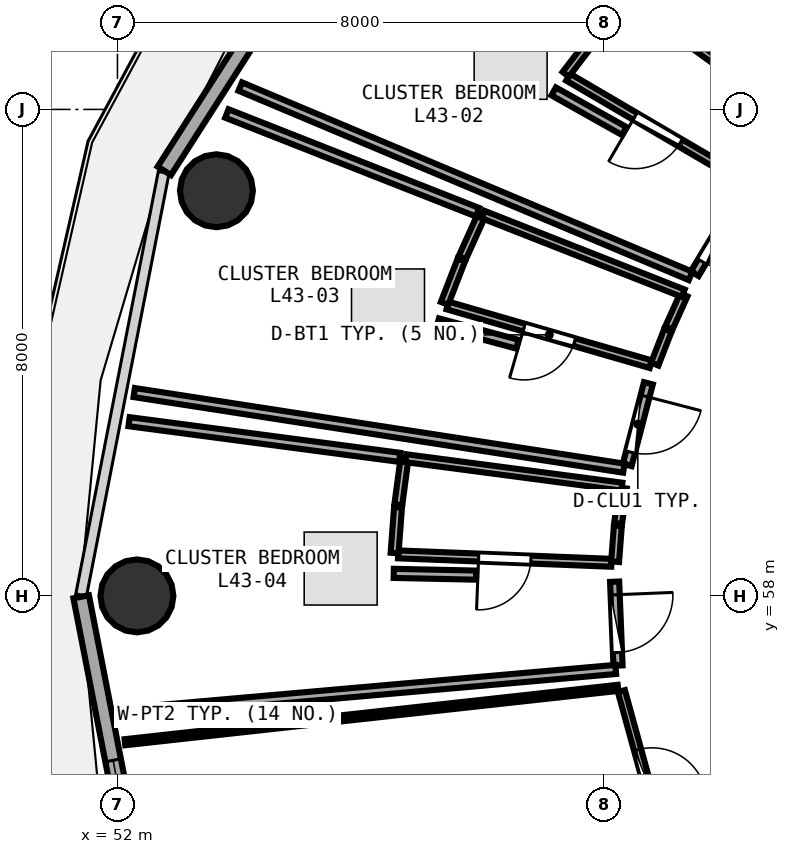
"""IFC4 building model, lengths in metres.
Left out: names, types, materials, properties, quantities, classifications, styles, units other than length and angle.
Written with IfcOpenShell. Run it as: python <this file> out.ifc"""

import sys

from ifc_helpers import new_model, si_unit, direction, frame, frame_2d, origin, origin_2d, place, context, subcontext, project, spatial, rectangle, circle, extrude, element, fill, save


model = new_model("IFC4")
c1 = context("Model", 3, precision=1e-05, world=origin(), true_north=direction((0.0, 1.0)))
c2 = subcontext(c1, "Body", "Model", "MODEL_VIEW")
j1 = project(units=[si_unit("LENGTHUNIT", "METRE"), si_unit("PLANEANGLEUNIT", "RADIAN")], contexts=[c1])
p1 = place(None, origin())
s1 = spatial("IfcSite", under=j1, at=p1, CompositionType="ELEMENT")
p2 = place(p1, origin())
s2 = spatial("IfcBuilding", under=s1, at=p2, CompositionType="ELEMENT")
p3 = place(p2, frame((0.0, 0.0, 169.35)))
s3 = spatial("IfcBuildingStorey", under=s2, at=p3, CompositionType="ELEMENT", Elevation=169.35)
for number, where, z_axis, x_axis in (
    (1, (53.627, 64.663, 0.0), (0.0, 0.0, 1.0), (1.0, 0.0, 0.0)),
    (2, (52.32, 58.0, 0.0), (0.0, 0.0, 1.0), (1.0, 0.0, 0.0)),
):
    element("IfcColumn", number, at=place(p3, frame(where, z_axis=z_axis, x_axis=x_axis)), inside=s3, PredefinedType="COLUMN", context=c2, shape_type="SweptSolid", body=[
        extrude(circle(Radius=0.6, at=origin_2d()), origin(), (0.0, 0.0, 1.0), 3.75),
    ])
p4 = place(p3, frame((56.679, 71.1, 0.0), z_axis=(0.0, 0.0, 1.0), x_axis=(-0.538801521808, -0.842432739213, 0.0)))
e3 = element("IfcWall", 3, at=p4, inside=s3, PredefinedType="SOLIDWALL", context=c2, shape_type="SweptSolid", body=[
    extrude(rectangle(XDim=7.253, YDim=0.26, at=frame_2d((3.627, 0.0))), origin(), (0.0, 0.0, 1.0), 3.475),
])
p5 = place(p4, frame((3.152, 0.0, 0.0)))
e4 = element("IfcOpeningElement", 4, at=p5, cuts=e3, PredefinedType="OPENING", context=c2, shape_type="SweptSolid", body=[
    extrude(rectangle(XDim=0.95, YDim=2.1, at=frame_2d((0.475, 1.05))), frame((0.0, 0.14, 0.0), z_axis=(0.0, -1.0, 0.0), x_axis=(1.0, 0.0, 0.0)), (0.0, 0.0, 1.0), 0.28),
])
p6 = place(p4, frame((1.572, 0.0, 0.85)))
e5 = element("IfcOpeningElement", 5, at=p6, cuts=e3, PredefinedType="OPENING", context=c2, shape_type="SweptSolid", body=[
    extrude(rectangle(XDim=1.2, YDim=1.45, at=frame_2d((0.6, 0.725))), frame((0.0, 0.14, 0.0), z_axis=(0.0, -1.0, 0.0), x_axis=(1.0, 0.0, 0.0)), (0.0, 0.0, 1.0), 0.28),
])
p7 = place(p3, frame((51.403, 57.985, 0.0), z_axis=(0.0, 0.0, 1.0), x_axis=(0.191716984769, -0.981450252306, 0.0)))
e6 = element("IfcWall", 6, at=p7, inside=s3, PredefinedType="SOLIDWALL", context=c2, shape_type="SweptSolid", body=[
    extrude(rectangle(XDim=7.079, YDim=0.26, at=frame_2d((3.54, 0.0))), origin(), (0.0, 0.0, 1.0), 3.475),
])
p8 = place(p7, frame((2.74, 0.0, 0.85)))
e7 = element("IfcOpeningElement", 7, at=p8, cuts=e6, PredefinedType="OPENING", context=c2, shape_type="SweptSolid", body=[
    extrude(rectangle(XDim=1.6, YDim=1.45, at=frame_2d((0.8, 0.725))), frame((0.0, 0.14, 0.0), z_axis=(0.0, -1.0, 0.0), x_axis=(1.0, 0.0, 0.0)), (0.0, 0.0, 1.0), 0.28),
])
p9 = place(p3, frame((62.353, 64.806, 0.0), z_axis=(0.0, 0.0, 1.0), x_axis=(-0.862644088452, 0.505811404239, 0.0)))
e8 = element("IfcWall", 8, at=p9, inside=s3, PredefinedType="PLUMBINGWALL", context=c2, shape_type="SweptSolid", body=[
    extrude(rectangle(XDim=3.409, YDim=0.13, at=frame_2d((1.704, 0.0))), origin(), (0.0, 0.0, 1.0), 2.975),
])
p10 = place(p9, frame((1.274, 0.0, 0.0)))
e9 = element("IfcOpeningElement", 9, at=p10, cuts=e8, PredefinedType="OPENING", context=c2, shape_type="SweptSolid", body=[
    extrude(rectangle(XDim=0.86, YDim=2.05, at=frame_2d((0.43, 1.025))), frame((0.0, 0.075, 0.0), z_axis=(0.0, -1.0, 0.0), x_axis=(1.0, 0.0, 0.0)), (0.0, 0.0, 1.0), 0.15),
])
p11 = place(p3, frame((62.225, 64.514, 0.0), z_axis=(0.0, 0.0, 1.0), x_axis=(-0.516038492654, -0.856565393942, 0.0)))
e10 = element("IfcWall", 10, at=p11, inside=s3, PredefinedType="PARTITIONING", context=c2, shape_type="SweptSolid", body=[
    extrude(rectangle(XDim=1.419, YDim=0.15, at=frame_2d((0.709, 0.0))), origin(), (0.0, 0.0, 1.0), 3.48),
])
p12 = place(p11, frame((0.234, 0.0, 0.0)))
e11 = element("IfcOpeningElement", 11, at=p12, cuts=e10, PredefinedType="OPENING", context=c2, shape_type="SweptSolid", body=[
    extrude(rectangle(XDim=0.95, YDim=2.08, at=frame_2d((0.475, 1.04))), frame((0.0, 0.085, 0.0), z_axis=(0.0, -1.0, 0.0), x_axis=(1.0, 0.0, 0.0)), (0.0, 0.0, 1.0), 0.17),
])
p13 = place(p3, frame((60.771, 61.81, 0.0), z_axis=(0.0, 0.0, 1.0), x_axis=(-0.960701289908, 0.277584278316, 0.0)))
e12 = element("IfcWall", 12, at=p13, inside=s3, PredefinedType="PLUMBINGWALL", context=c2, shape_type="SweptSolid", body=[
    extrude(rectangle(XDim=3.479, YDim=0.13, at=frame_2d((1.739, 0.0))), origin(), (0.0, 0.0, 1.0), 3.175),
])
p14 = place(p13, frame((1.309, 0.0, 0.0)))
e13 = element("IfcOpeningElement", 13, at=p14, cuts=e12, PredefinedType="OPENING", context=c2, shape_type="SweptSolid", body=[
    extrude(rectangle(XDim=0.86, YDim=2.05, at=frame_2d((0.43, 1.025))), frame((0.0, 0.075, 0.0), z_axis=(0.0, -1.0, 0.0), x_axis=(1.0, 0.0, 0.0)), (0.0, 0.0, 1.0), 0.15),
])
p15 = place(p3, frame((60.732, 61.496, 0.0), z_axis=(0.0, 0.0, 1.0), x_axis=(-0.251297806583, -0.967909816257, 0.0)))
e14 = element("IfcWall", 14, at=p15, inside=s3, PredefinedType="PARTITIONING", context=c2, shape_type="SweptSolid", body=[
    extrude(rectangle(XDim=1.388, YDim=0.15, at=frame_2d((0.694, 0.0))), origin(), (0.0, 0.0, 1.0), 3.48),
])
p16 = place(p15, frame((0.219, 0.0, 0.0)))
e15 = element("IfcOpeningElement", 15, at=p16, cuts=e14, PredefinedType="OPENING", context=c2, shape_type="SweptSolid", body=[
    extrude(rectangle(XDim=0.95, YDim=2.08, at=frame_2d((0.475, 1.04))), frame((0.0, 0.085, 0.0), z_axis=(0.0, -1.0, 0.0), x_axis=(1.0, 0.0, 0.0)), (0.0, 0.0, 1.0), 0.17),
])
p17 = place(p3, frame((60.123, 58.544, 0.0), z_axis=(0.0, 0.0, 1.0), x_axis=(-0.999224670523, 0.039370773652, 0.0)))
e16 = element("IfcWall", 16, at=p17, inside=s3, PredefinedType="PLUMBINGWALL", context=c2, shape_type="SweptSolid", body=[
    extrude(rectangle(XDim=3.51, YDim=0.13, at=frame_2d((1.755, 0.0))), origin(), (0.0, 0.0, 1.0), 3.175),
])
p18 = place(p17, frame((1.325, 0.0, 0.0)))
e17 = element("IfcOpeningElement", 17, at=p18, cuts=e16, PredefinedType="OPENING", context=c2, shape_type="SweptSolid", body=[
    extrude(rectangle(XDim=0.86, YDim=2.05, at=frame_2d((0.43, 1.025))), frame((0.0, 0.075, 0.0), z_axis=(0.0, -1.0, 0.0), x_axis=(1.0, 0.0, 0.0)), (0.0, 0.0, 1.0), 0.15),
])
p19 = place(p3, frame((60.177, 58.233, 0.0), z_axis=(0.0, 0.0, 1.0), x_axis=(0.040688656331, -0.999171873726, 0.0)))
e18 = element("IfcWall", 18, at=p19, inside=s3, PredefinedType="PARTITIONING", context=c2, shape_type="SweptSolid", body=[
    extrude(rectangle(XDim=1.38, YDim=0.15, at=frame_2d((0.69, 0.0))), origin(), (0.0, 0.0, 1.0), 2.975),
])
p20 = place(p19, frame((0.215, 0.0, 0.0)))
e19 = element("IfcOpeningElement", 19, at=p20, cuts=e18, PredefinedType="OPENING", context=c2, shape_type="SweptSolid", body=[
    extrude(rectangle(XDim=0.95, YDim=2.08, at=frame_2d((0.475, 1.04))), frame((0.0, 0.085, 0.0), z_axis=(0.0, -1.0, 0.0), x_axis=(1.0, 0.0, 0.0)), (0.0, 0.0, 1.0), 0.17),
])
p21 = place(p3, frame((60.288, 56.434, 0.0), z_axis=(0.0, 0.0, 1.0), x_axis=(0.265473290907, -0.964118214647, 0.0)))
e20 = element("IfcWall", 20, at=p21, inside=s3, PredefinedType="PARTITIONING", context=c2, shape_type="SweptSolid", body=[
    extrude(rectangle(XDim=2.901, YDim=0.12, at=frame_2d((1.451, 0.0))), origin(), (0.0, 0.0, 1.0), 3.235),
])
p22 = place(p21, frame((1.001, 0.0, 0.0)))
e21 = element("IfcOpeningElement", 21, at=p22, cuts=e20, PredefinedType="OPENING", context=c2, shape_type="SweptSolid", body=[
    extrude(rectangle(XDim=0.9, YDim=2.08, at=frame_2d((0.45, 1.04))), frame((0.0, 0.07, 0.0), z_axis=(0.0, -1.0, 0.0), x_axis=(1.0, 0.0, 0.0)), (0.0, 0.0, 1.0), 0.14),
])
p23 = place(p3, frame((63.41, 66.053, 0.0), z_axis=(0.0, 0.0, 1.0), x_axis=(-0.794605605324, 0.607125960561, 0.0)))
e22 = element("IfcWall", 22, at=p23, inside=s3, PredefinedType="PARTITIONING", context=c2, shape_type="SweptSolid", body=[
    extrude(rectangle(XDim=6.878, YDim=0.15, at=frame_2d((3.439, 0.0))), origin(), (0.0, 0.0, 1.0), 2.975),
])
p24 = place(p3, frame((59.373, 66.577, 0.0), z_axis=(0.0, 0.0, 1.0), x_axis=(0.607392357166, 0.794401991724, 0.0)))
e23 = element("IfcWall", 23, at=p24, inside=s3, PredefinedType="PLUMBINGWALL", context=c2, shape_type="SweptSolid", body=[
    extrude(rectangle(XDim=0.785, YDim=0.13, at=frame_2d((0.392, 0.0))), origin(), (0.0, 0.0, 1.0), 3.48),
])
p25 = place(p3, frame((60.414, 67.836, 0.0), z_axis=(0.0, 0.0, 1.0), x_axis=(0.809212412411, -0.587516188372, 0.0)))
e24 = element("IfcWall", 24, at=p25, inside=s3, PredefinedType="PLUMBINGWALL", context=c2, shape_type="SweptSolid", body=[
    extrude(rectangle(XDim=3.456, YDim=0.13, at=frame_2d((1.728, 0.0))), origin(), (0.0, 0.0, 1.0), 3.175),
])
p26 = place(p3, frame((61.425, 63.262, 0.0), z_axis=(0.0, 0.0, 1.0), x_axis=(-0.921852058971, 0.387541973688, 0.0)))
e25 = element("IfcWall", 25, at=p26, inside=s3, PredefinedType="PARTITIONING", context=c2, shape_type="SweptSolid", body=[
    extrude(rectangle(XDim=8.033, YDim=0.15, at=frame_2d((4.016, 0.0))), origin(), (0.0, 0.0, 1.0), 2.975),
])
p27 = place(p3, frame((59.174, 66.296, 0.0), z_axis=(0.0, 0.0, 1.0), x_axis=(0.871883609801, -0.489713151712, 0.0)))
e26 = element("IfcWall", 26, at=p27, inside=s3, PredefinedType="PARTITIONING", context=c2, shape_type="SweptSolid", body=[
    extrude(rectangle(XDim=1.333, YDim=0.15, at=frame_2d((0.666, 0.0))), origin(), (0.0, 0.0, 1.0), 3.175),
])
p28 = place(p3, frame((61.315, 62.952, 0.0), z_axis=(0.0, 0.0, 1.0), x_axis=(-0.411193988453, -0.91154786153, 0.0)))
e27 = element("IfcWall", 27, at=p28, inside=s3, PredefinedType="PLUMBINGWALL", context=c2, shape_type="SweptSolid", body=[
    extrude(rectangle(XDim=0.6, YDim=0.13, at=frame_2d((0.3, 0.0))), origin(), (0.0, 0.0, 1.0), 3.235),
])
p29 = place(p3, frame((61.053, 62.368, 0.0), z_axis=(0.0, 0.0, 1.0), x_axis=(-0.362426543202, -0.932012339394, 0.0)))
e28 = element("IfcWall", 28, at=p29, inside=s3, PredefinedType="PLUMBINGWALL", context=c2, shape_type="SweptSolid", body=[
    extrude(rectangle(XDim=0.597, YDim=0.13, at=frame_2d((0.299, 0.0))), origin(), (0.0, 0.0, 1.0), 3.235),
])
p30 = place(p3, frame((57.379, 62.811, 0.0), z_axis=(0.0, 0.0, 1.0), x_axis=(0.361307204634, 0.932446837026, 0.0)))
e29 = element("IfcWall", 29, at=p30, inside=s3, PredefinedType="PLUMBINGWALL", context=c2, shape_type="SweptSolid", body=[
    extrude(rectangle(XDim=0.766, YDim=0.13, at=frame_2d((0.383, 0.0))), origin(), (0.0, 0.0, 1.0), 3.48),
])
p31 = place(p3, frame((57.671, 63.561, 0.0), z_axis=(0.0, 0.0, 1.0), x_axis=(0.411356558761, 0.911474509553, 0.0)))
e30 = element("IfcWall", 30, at=p31, inside=s3, PredefinedType="PLUMBINGWALL", context=c2, shape_type="SweptSolid", body=[
    extrude(rectangle(XDim=0.767, YDim=0.13, at=frame_2d((0.384, 0.0))), origin(), (0.0, 0.0, 1.0), 3.48),
])
p32 = place(p3, frame((58.014, 64.272, 0.0), z_axis=(0.0, 0.0, 1.0), x_axis=(0.930594484037, -0.366051780871, 0.0)))
e31 = element("IfcWall", 31, at=p32, inside=s3, PredefinedType="PLUMBINGWALL", context=c2, shape_type="SweptSolid", body=[
    extrude(rectangle(XDim=3.536, YDim=0.13, at=frame_2d((1.768, 0.0))), origin(), (0.0, 0.0, 1.0), 3.175),
])
p33 = place(p3, frame((60.329, 60.1, 0.0), z_axis=(0.0, 0.0, 1.0), x_axis=(-0.988280426205, 0.152649268523, 0.0)))
e32 = element("IfcWall", 32, at=p33, inside=s3, PredefinedType="PARTITIONING", context=c2, shape_type="SweptSolid", body=[
    extrude(rectangle(XDim=8.149, YDim=0.15, at=frame_2d((4.074, 0.0))), origin(), (0.0, 0.0, 1.0), 3.025),
])
p34 = place(p3, frame((53.799, 65.933, 0.0), z_axis=(0.0, 0.0, 1.0), x_axis=(0.930447107731, -0.366426226839, 0.0)))
e33 = element("IfcWall", 33, at=p34, inside=s3, PredefinedType="PARTITIONING", context=c2, shape_type="SweptSolid", body=[
    extrude(rectangle(XDim=4.431, YDim=0.15, at=frame_2d((2.215, 0.0))), origin(), (0.0, 0.0, 1.0), 2.975),
])
p35 = place(p3, frame((57.269, 62.492, 0.0), z_axis=(0.0, 0.0, 1.0), x_axis=(0.965540944104, -0.260251196461, 0.0)))
e34 = element("IfcWall", 34, at=p35, inside=s3, PredefinedType="PARTITIONING", context=c2, shape_type="SweptSolid", body=[
    extrude(rectangle(XDim=1.355, YDim=0.15, at=frame_2d((0.678, 0.0))), origin(), (0.0, 0.0, 1.0), 3.175),
])
for number, where, z_axis, x_axis in (
    (35, (60.312, 59.774, 0.0), (0.0, 0.0, 1.0), (-0.133, -0.991, 0.0)),
    (36, (60.229, 59.15, 0.0), (0.0, 0.0, 1.0), (-0.076, -0.997, 0.0)),
):
    element("IfcWall", number, at=place(p3, frame(where, z_axis=z_axis, x_axis=x_axis)), inside=s3, PredefinedType="PLUMBINGWALL", context=c2, shape_type="SweptSolid", body=[
        extrude(rectangle(XDim=0.59, YDim=0.13, at=frame_2d((0.295, 0.0))), origin(), (0.0, 0.0, 1.0), 3.48),
    ])
p36 = place(p3, frame((56.558, 58.705, 0.0), z_axis=(0.0, 0.0, 1.0), x_axis=(0.075312246351, 0.997159999975, 0.0)))
e37 = element("IfcWall", 37, at=p36, inside=s3, PredefinedType="PLUMBINGWALL", context=c2, shape_type="SweptSolid", body=[
    extrude(rectangle(XDim=0.755, YDim=0.13, at=frame_2d((0.378, 0.0))), origin(), (0.0, 0.0, 1.0), 3.48),
])
p37 = place(p3, frame((56.619, 59.498, 0.0), z_axis=(0.0, 0.0, 1.0), x_axis=(0.133009537515, 0.9911147577, 0.0)))
e38 = element("IfcWall", 38, at=p37, inside=s3, PredefinedType="PLUMBINGWALL", context=c2, shape_type="SweptSolid", body=[
    extrude(rectangle(XDim=0.756, YDim=0.13, at=frame_2d((0.378, 0.0))), origin(), (0.0, 0.0, 1.0), 3.48),
])
p38 = place(p3, frame((56.742, 60.264, 0.0), z_axis=(0.0, 0.0, 1.0), x_axis=(0.991446642818, -0.130512660092, 0.0)))
e39 = element("IfcWall", 39, at=p38, inside=s3, PredefinedType="PLUMBINGWALL", context=c2, shape_type="SweptSolid", body=[
    extrude(rectangle(XDim=3.584, YDim=0.13, at=frame_2d((1.792, 0.0))), origin(), (0.0, 0.0, 1.0), 3.175),
])
p39 = place(p3, frame((60.195, 56.791, 0.0), z_axis=(0.0, 0.0, 1.0), x_axis=(-0.996155607827, -0.087601398364, 0.0)))
e40 = element("IfcWall", 40, at=p39, inside=s3, PredefinedType="PARTITIONING", context=c2, shape_type="SweptSolid", body=[
    extrude(rectangle(XDim=8.163, YDim=0.15, at=frame_2d((4.082, 0.0))), origin(), (0.0, 0.0, 1.0), 3.025),
])
p40 = place(p3, frame((52.191, 60.865, 0.0), z_axis=(0.0, 0.0, 1.0), x_axis=(0.991434667169, -0.130603601543, 0.0)))
e41 = element("IfcWall", 41, at=p40, inside=s3, PredefinedType="PARTITIONING", context=c2, shape_type="SweptSolid", body=[
    extrude(rectangle(XDim=4.49, YDim=0.15, at=frame_2d((2.245, 0.0))), origin(), (0.0, 0.0, 1.0), 3.025),
])
p41 = place(p3, frame((56.544, 58.37, 0.0), z_axis=(0.0, 0.0, 1.0), x_axis=(0.999773811605, -0.021267948399, 0.0)))
e42 = element("IfcWall", 42, at=p41, inside=s3, PredefinedType="PARTITIONING", context=c2, shape_type="SweptSolid", body=[
    extrude(rectangle(XDim=1.354, YDim=0.15, at=frame_2d((0.677, 0.0))), origin(), (0.0, 0.0, 1.0), 3.175),
])
p42 = place(p3, frame((52.123, 55.594, 0.0), z_axis=(0.0, 0.0, 1.0), x_axis=(0.993977526639, 0.109584107134, 0.0)))
e43 = element("IfcWall", 43, at=p42, inside=s3, PredefinedType="PARTITIONING", context=c2, shape_type="SweptSolid", body=[
    extrude(rectangle(XDim=8.158, YDim=0.1, at=frame_2d((4.079, 0.0))), origin(), (0.0, 0.0, 1.0), 3.025),
])
p43 = place(p8, origin())
e44 = element("IfcWindow", 44, at=p43, inside=s3, PartitioningType="SINGLE_PANEL", PredefinedType="WINDOW", context=c2, shape_type="SweptSolid", body=[
    extrude(rectangle(XDim=1.6, YDim=1.45, at=frame_2d((0.8, 0.725))), frame((0.0, 0.03, 0.0), z_axis=(0.0, -1.0, 0.0), x_axis=(1.0, 0.0, 0.0)), (0.0, 0.0, 1.0), 0.06),
])
fill(e7, e44)
p44 = place(p10, origin())
e45 = element("IfcDoor", 45, at=p44, inside=s3, OperationType="SINGLE_SWING_RIGHT", PredefinedType="DOOR", context=c2, shape_type="SweptSolid", body=[
    extrude(rectangle(XDim=0.86, YDim=2.05, at=frame_2d((0.43, 1.025))), frame((0.0, 0.025, 0.0), z_axis=(0.0, -1.0, 0.0), x_axis=(1.0, 0.0, 0.0)), (0.0, 0.0, 1.0), 0.05),
])
fill(e9, e45)
p45 = place(p12, origin())
e46 = element("IfcDoor", 46, at=p45, inside=s3, OperationType="SINGLE_SWING_LEFT", PredefinedType="DOOR", context=c2, shape_type="SweptSolid", body=[
    extrude(rectangle(XDim=0.95, YDim=2.08, at=frame_2d((0.475, 1.04))), frame((0.0, 0.025, 0.0), z_axis=(0.0, -1.0, 0.0), x_axis=(1.0, 0.0, 0.0)), (0.0, 0.0, 1.0), 0.05),
])
fill(e11, e46)
p46 = place(p14, origin())
e47 = element("IfcDoor", 47, at=p46, inside=s3, OperationType="SINGLE_SWING_RIGHT", PredefinedType="DOOR", context=c2, shape_type="SweptSolid", body=[
    extrude(rectangle(XDim=0.86, YDim=2.05, at=frame_2d((0.43, 1.025))), frame((0.0, 0.025, 0.0), z_axis=(0.0, -1.0, 0.0), x_axis=(1.0, 0.0, 0.0)), (0.0, 0.0, 1.0), 0.05),
])
fill(e13, e47)
p47 = place(p16, origin())
e48 = element("IfcDoor", 48, at=p47, inside=s3, OperationType="SINGLE_SWING_LEFT", PredefinedType="DOOR", context=c2, shape_type="SweptSolid", body=[
    extrude(rectangle(XDim=0.95, YDim=2.08, at=frame_2d((0.475, 1.04))), frame((0.0, 0.025, 0.0), z_axis=(0.0, -1.0, 0.0), x_axis=(1.0, 0.0, 0.0)), (0.0, 0.0, 1.0), 0.05),
])
fill(e15, e48)
p48 = place(p18, origin())
e49 = element("IfcDoor", 49, at=p48, inside=s3, OperationType="SINGLE_SWING_RIGHT", PredefinedType="DOOR", context=c2, shape_type="SweptSolid", body=[
    extrude(rectangle(XDim=0.86, YDim=2.05, at=frame_2d((0.43, 1.025))), frame((0.0, 0.025, 0.0), z_axis=(0.0, -1.0, 0.0), x_axis=(1.0, 0.0, 0.0)), (0.0, 0.0, 1.0), 0.05),
])
fill(e17, e49)
p49 = place(p20, origin())
e50 = element("IfcDoor", 50, at=p49, inside=s3, OperationType="SINGLE_SWING_LEFT", PredefinedType="DOOR", context=c2, shape_type="SweptSolid", body=[
    extrude(rectangle(XDim=0.95, YDim=2.08, at=frame_2d((0.475, 1.04))), frame((0.0, 0.025, 0.0), z_axis=(0.0, -1.0, 0.0), x_axis=(1.0, 0.0, 0.0)), (0.0, 0.0, 1.0), 0.05),
])
fill(e19, e50)
p50 = place(p22, origin())
e51 = element("IfcDoor", 51, at=p50, inside=s3, OperationType="SINGLE_SWING_RIGHT", PredefinedType="DOOR", context=c2, shape_type="SweptSolid", body=[
    extrude(rectangle(XDim=0.9, YDim=2.08, at=frame_2d((0.45, 1.04))), frame((0.0, 0.025, 0.0), z_axis=(0.0, -1.0, 0.0), x_axis=(1.0, 0.0, 0.0)), (0.0, 0.0, 1.0), 0.05),
])
fill(e21, e51)
save(model, sys.argv[1])
